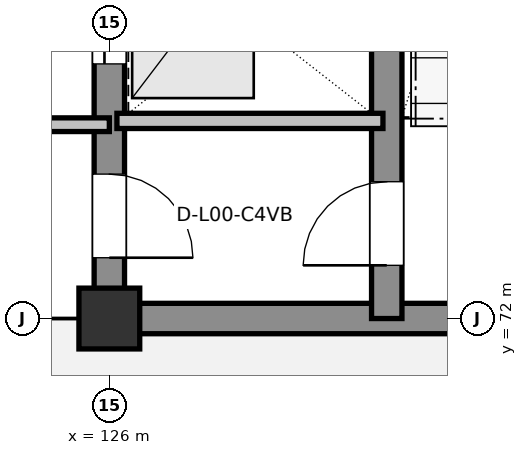
"""IFC4 building model, lengths in metres.
Left out: names, types, materials, properties, quantities, classifications, styles, units other than length and angle.
Written with IfcOpenShell. Run it as: python <this file> out.ifc"""

import sys

from ifc_helpers import new_model, si_unit, direction, frame, frame_2d, origin, origin_2d, place, context, subcontext, project, spatial, rectangle, extrude, element, fill, save


model = new_model("IFC4")
c1 = context("Model", 3, precision=1e-05, world=origin(), true_north=direction((0.0, 1.0)))
c2 = subcontext(c1, "Body", "Model", "MODEL_VIEW")
j1 = project(units=[si_unit("LENGTHUNIT", "METRE"), si_unit("PLANEANGLEUNIT", "RADIAN")], contexts=[c1])
p1 = place(None, origin())
s1 = spatial("IfcSite", under=j1, at=p1, CompositionType="ELEMENT")
p2 = place(p1, origin())
s2 = spatial("IfcBuilding", under=s1, at=p2, CompositionType="ELEMENT")
p3 = place(p2, origin())
s3 = spatial("IfcBuildingStorey", under=s2, at=p3, CompositionType="ELEMENT", Elevation=0.0)
p4 = place(p3, frame((126.0, 72.0, 0.0), z_axis=(0.0, 0.0, 1.0), x_axis=(1.0, 0.0, 0.0)))
e1 = element("IfcColumn", 1, at=p4, inside=s3, PredefinedType="COLUMN", context=c2, shape_type="SweptSolid", body=[
    extrude(rectangle(XDim=0.8, YDim=0.8, at=origin_2d()), origin(), (0.0, 0.0, 1.0), 5.4),
])
p5 = place(p3, frame((126.0, 72.0, 0.0), z_axis=(0.0, 0.0, 1.0), x_axis=(1.0, 0.0, 0.0)))
e2 = element("IfcWall", 2, at=p5, inside=s3, PredefinedType="SHEAR", context=c2, shape_type="SweptSolid", body=[
    extrude(rectangle(XDim=9.0, YDim=0.4, at=frame_2d((4.5, 0.0))), origin(), (0.0, 0.0, 1.0), 5.16),
])
p6 = place(p5, frame((5.4, 0.0, 0.0)))
e3 = element("IfcOpeningElement", 3, at=p6, cuts=e2, PredefinedType="OPENING", context=c2, shape_type="SweptSolid", body=[
    extrude(rectangle(XDim=1.8, YDim=2.35, at=frame_2d((0.9, 1.175))), frame((0.0, 0.21, 0.0), z_axis=(0.0, -1.0, 0.0), x_axis=(1.0, 0.0, 0.0)), (0.0, 0.0, 1.0), 0.42),
])
p7 = place(p3, frame((126.0, 90.0, 0.0), z_axis=(0.0, 0.0, 1.0), x_axis=(0.0, -1.0, 0.0)))
e4 = element("IfcWall", 4, at=p7, inside=s3, PredefinedType="SHEAR", context=c2, shape_type="SweptSolid", body=[
    extrude(rectangle(XDim=18.0, YDim=0.4, at=frame_2d((9.0, 0.0))), origin(), (0.0, 0.0, 1.0), 5.16),
])
p8 = place(p7, frame((16.1, 0.0, 0.0)))
e5 = element("IfcOpeningElement", 5, at=p8, cuts=e4, PredefinedType="OPENING", context=c2, shape_type="SweptSolid", body=[
    extrude(rectangle(XDim=1.1, YDim=2.16, at=frame_2d((0.55, 1.08))), frame((0.0, 0.21, 0.0), z_axis=(0.0, -1.0, 0.0), x_axis=(1.0, 0.0, 0.0)), (0.0, 0.0, 1.0), 0.42),
])
p9 = place(p7, frame((13.45, 0.0, 0.0)))
e6 = element("IfcOpeningElement", 6, at=p9, cuts=e4, PredefinedType="OPENING", context=c2, shape_type="SweptSolid", body=[
    extrude(rectangle(XDim=1.2, YDim=2.2, at=frame_2d((0.6, 1.1))), frame((0.0, 0.21, 0.0), z_axis=(0.0, -1.0, 0.0), x_axis=(1.0, 0.0, 0.0)), (0.0, 0.0, 1.0), 0.42),
])
p10 = place(p7, frame((10.65, 0.0, 0.0)))
e7 = element("IfcOpeningElement", 7, at=p10, cuts=e4, PredefinedType="OPENING", context=c2, shape_type="SweptSolid", body=[
    extrude(rectangle(XDim=1.2, YDim=2.2, at=frame_2d((0.6, 1.1))), frame((0.0, 0.21, 0.0), z_axis=(0.0, -1.0, 0.0), x_axis=(1.0, 0.0, 0.0)), (0.0, 0.0, 1.0), 0.42),
])
p11 = place(p7, frame((5.9, 0.0, 0.0)))
e8 = element("IfcOpeningElement", 8, at=p11, cuts=e4, PredefinedType="OPENING", context=c2, shape_type="SweptSolid", body=[
    extrude(rectangle(XDim=1.8, YDim=2.35, at=frame_2d((0.9, 1.175))), frame((0.0, 0.21, 0.0), z_axis=(0.0, -1.0, 0.0), x_axis=(1.0, 0.0, 0.0)), (0.0, 0.0, 1.0), 0.42),
])
p12 = place(p3, frame((129.65, 72.0, 0.0), z_axis=(0.0, 0.0, 1.0), x_axis=(0.0, 1.0, 0.0)))
e9 = element("IfcWall", 9, at=p12, inside=s3, PredefinedType="SHEAR", context=c2, shape_type="SweptSolid", body=[
    extrude(rectangle(XDim=18.0, YDim=0.4, at=frame_2d((9.0, 0.0))), origin(), (0.0, 0.0, 1.0), 5.16),
])
p13 = place(p12, frame((0.7, 0.0, 0.0)))
e10 = element("IfcOpeningElement", 10, at=p13, cuts=e9, PredefinedType="OPENING", context=c2, shape_type="SweptSolid", body=[
    extrude(rectangle(XDim=1.1, YDim=2.16, at=frame_2d((0.55, 1.08))), frame((0.0, 0.21, 0.0), z_axis=(0.0, -1.0, 0.0), x_axis=(1.0, 0.0, 0.0)), (0.0, 0.0, 1.0), 0.42),
])
p14 = place(p3, frame((126.1, 74.6, 0.0), z_axis=(0.0, 0.0, 1.0), x_axis=(1.0, 0.0, 0.0)))
e11 = element("IfcWall", 11, at=p14, inside=s3, PredefinedType="PARTITIONING", context=c2, shape_type="SweptSolid", body=[
    extrude(rectangle(XDim=3.5, YDim=0.2, at=frame_2d((1.75, 0.0))), origin(), (0.0, 0.0, 1.0), 5.16),
])
p15 = place(p3, frame((122.25, 74.55, 0.0), z_axis=(0.0, 0.0, 1.0), x_axis=(1.0, 0.0, 0.0)))
e12 = element("IfcWall", 12, at=p15, inside=s3, PredefinedType="PARTITIONING", context=c2, shape_type="SweptSolid", body=[
    extrude(rectangle(XDim=3.75, YDim=0.18, at=frame_2d((1.875, 0.0))), origin(), (0.0, 0.0, 1.0), 5.16),
])
p16 = place(p13, origin())
e13 = element("IfcDoor", 13, at=p16, inside=s3, OperationType="SINGLE_SWING_LEFT", PredefinedType="DOOR", context=c2, shape_type="SweptSolid", body=[
    extrude(rectangle(XDim=1.1, YDim=2.16, at=frame_2d((0.55, 1.08))), frame((0.0, 0.025, 0.0), z_axis=(0.0, -1.0, 0.0), x_axis=(1.0, 0.0, 0.0)), (0.0, 0.0, 1.0), 0.05),
])
fill(e10, e13)
p17 = place(p8, origin())
e14 = element("IfcDoor", 14, at=p17, inside=s3, OperationType="SINGLE_SWING_RIGHT", PredefinedType="DOOR", context=c2, shape_type="SweptSolid", body=[
    extrude(rectangle(XDim=1.1, YDim=2.16, at=frame_2d((0.55, 1.08))), frame((0.0, 0.025, 0.0), z_axis=(0.0, -1.0, 0.0), x_axis=(1.0, 0.0, 0.0)), (0.0, 0.0, 1.0), 0.05),
])
fill(e5, e14)
p18 = place(p9, origin())
e15 = element("IfcDoor", 15, at=p18, inside=s3, OperationType="SLIDING_TO_LEFT", PredefinedType="DOOR", context=c2, shape_type="SweptSolid", body=[
    extrude(rectangle(XDim=1.2, YDim=2.2, at=frame_2d((0.6, 1.1))), frame((0.0, 0.025, 0.0), z_axis=(0.0, -1.0, 0.0), x_axis=(1.0, 0.0, 0.0)), (0.0, 0.0, 1.0), 0.05),
])
fill(e6, e15)
save(model, sys.argv[1])
